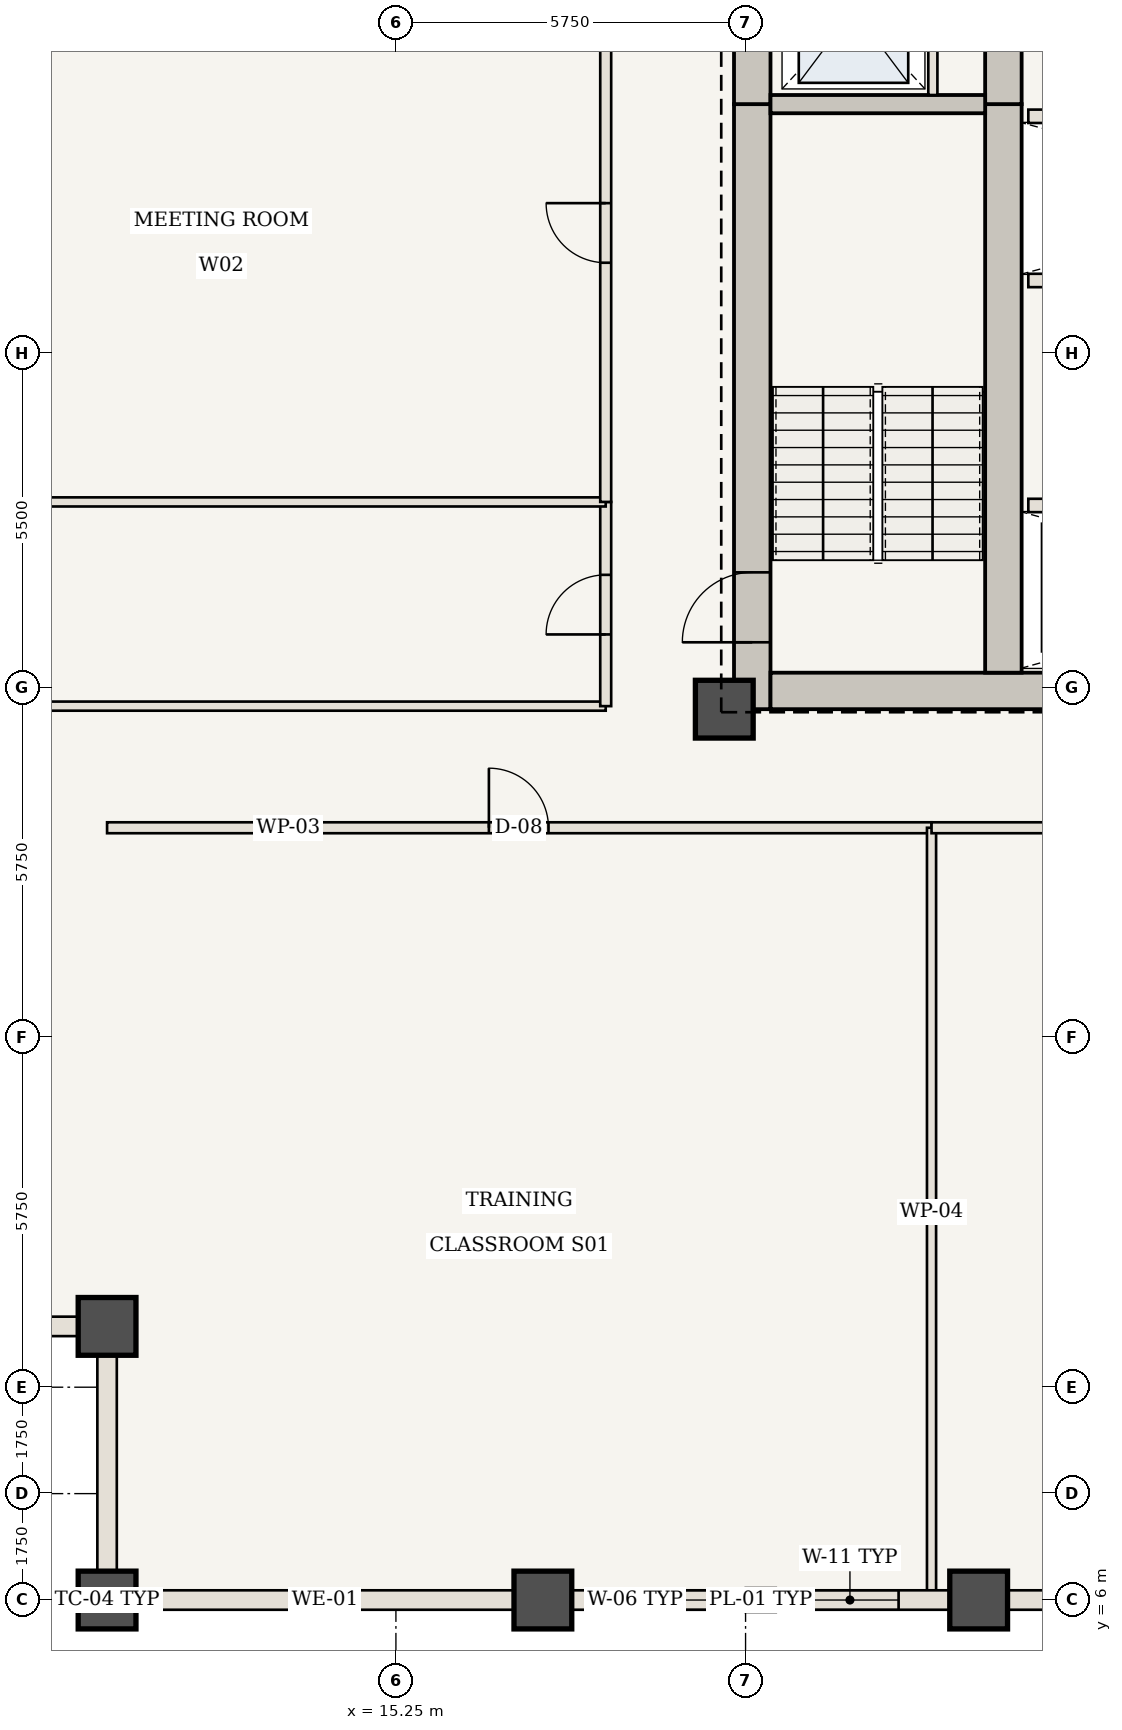
"""IFC4 building model, lengths in metres.
Left out: names, types, materials, properties, quantities, classifications, styles, units other than length and angle.
Written with IfcOpenShell. Run it as: python <this file> out.ifc"""

import sys

from ifc_helpers import new_model, si_unit, direction, frame, frame_2d, origin, origin_2d, place, context, subcontext, project, spatial, rectangle, extrude, element, fill, save


model = new_model("IFC4")
c1 = context("Model", 3, precision=1e-05, world=origin(), true_north=direction((0.0, 1.0)))
c2 = subcontext(c1, "Body", "Model", "MODEL_VIEW")
j1 = project(units=[si_unit("LENGTHUNIT", "METRE"), si_unit("PLANEANGLEUNIT", "RADIAN")], contexts=[c1])
p1 = place(None, origin())
s1 = spatial("IfcSite", under=j1, at=p1, CompositionType="ELEMENT")
p2 = place(p1, origin())
s2 = spatial("IfcBuilding", under=s1, at=p2, CompositionType="ELEMENT")
p3 = place(p2, frame((0.0, 0.0, 133.7)))
s3 = spatial("IfcBuildingStorey", under=s2, at=p3, CompositionType="ELEMENT", Elevation=133.7)
p4 = place(p3, frame((21.11, 20.65, 0.0), z_axis=(0.0, 0.0, 1.0), x_axis=(0.0, 1.0, 0.0)))
e1 = element("IfcWall", 1, at=p4, inside=s3, PredefinedType="SHEAR", context=c2, shape_type="SweptSolid", body=[
    extrude(rectangle(XDim=9.95, YDim=0.6, at=frame_2d((4.975, 0.0))), origin(), (0.0, 0.0, 1.0), 3.85),
])
p5 = place(p4, frame((1.1, 0.0, 0.0)))
e2 = element("IfcOpeningElement", 2, at=p5, cuts=e1, PredefinedType="OPENING", context=c2, shape_type="SweptSolid", body=[
    extrude(rectangle(XDim=1.15, YDim=2.15, at=frame_2d((0.575, 1.075))), frame((0.0, 0.31, 0.0), z_axis=(0.0, -1.0, 0.0), x_axis=(1.0, 0.0, 0.0)), (0.0, 0.0, 1.0), 0.62),
])
p6 = place(p3, frame((21.11, 30.6, 0.0), z_axis=(0.0, 0.0, 1.0), x_axis=(0.0, 1.0, 0.0)))
e3 = element("IfcWall", 3, at=p6, inside=s3, PredefinedType="SHEAR", context=c2, shape_type="SweptSolid", body=[
    extrude(rectangle(XDim=12.7, YDim=0.6, at=frame_2d((6.35, 0.0))), origin(), (0.0, 0.0, 1.0), 3.85),
])
p7 = place(p6, frame((4.2, 0.0, 0.0)))
e4 = element("IfcOpeningElement", 4, at=p7, cuts=e3, PredefinedType="OPENING", context=c2, shape_type="SweptSolid", body=[
    extrude(rectangle(XDim=1.1, YDim=2.15, at=frame_2d((0.55, 1.075))), frame((0.0, 0.31, 0.0), z_axis=(0.0, -1.0, 0.0), x_axis=(1.0, 0.0, 0.0)), (0.0, 0.0, 1.0), 0.62),
])
p8 = place(p6, frame((9.2, 0.0, 0.0)))
e5 = element("IfcOpeningElement", 5, at=p8, cuts=e3, PredefinedType="OPENING", context=c2, shape_type="SweptSolid", body=[
    extrude(rectangle(XDim=0.92, YDim=2.1, at=frame_2d((0.46, 1.05))), frame((0.0, 0.31, 0.0), z_axis=(0.0, -1.0, 0.0), x_axis=(1.0, 0.0, 0.0)), (0.0, 0.0, 1.0), 0.62),
])
p9 = place(p3, frame((21.41, 20.95, 0.0), z_axis=(0.0, 0.0, 1.0), x_axis=(1.0, 0.0, 0.0)))
e6 = element("IfcWall", 6, at=p9, inside=s3, PredefinedType="SHEAR", context=c2, shape_type="SweptSolid", body=[
    extrude(rectangle(XDim=13.74, YDim=0.6, at=frame_2d((6.87, 0.0))), origin(), (0.0, 0.0, 1.0), 3.85),
])
p10 = place(p3, frame((25.24, 21.25, 0.0), z_axis=(0.0, 0.0, 1.0), x_axis=(0.0, 1.0, 0.0)))
e7 = element("IfcWall", 7, at=p10, inside=s3, PredefinedType="SHEAR", context=c2, shape_type="SweptSolid", body=[
    extrude(rectangle(XDim=9.35, YDim=0.6, at=frame_2d((4.675, 0.0))), origin(), (0.0, 0.0, 1.0), 3.85),
])
p11 = place(p3, frame((25.24, 30.6, 0.0), z_axis=(0.0, 0.0, 1.0), x_axis=(0.0, 1.0, 0.0)))
e8 = element("IfcWall", 8, at=p11, inside=s3, PredefinedType="SHEAR", context=c2, shape_type="SweptSolid", body=[
    extrude(rectangle(XDim=12.1, YDim=0.6, at=frame_2d((6.05, 0.0))), origin(), (0.0, 0.0, 1.0), 3.85),
])
p12 = place(p11, frame((6.25, 0.0, 0.0)))
e9 = element("IfcOpeningElement", 9, at=p12, cuts=e8, PredefinedType="OPENING", context=c2, shape_type="SweptSolid", body=[
    extrude(rectangle(XDim=1.1, YDim=2.15, at=frame_2d((0.55, 1.075))), frame((0.0, 0.31, 0.0), z_axis=(0.0, -1.0, 0.0), x_axis=(1.0, 0.0, 0.0)), (0.0, 0.0, 1.0), 0.62),
])
for number, where, z_axis, x_axis in (
    (10, (20.65, 20.65, 0.0), (0.0, 0.0, 1.0), (1.0, 0.0, 0.0)),
    (11, (10.5, 6.0, 0.0), (0.0, 0.0, 1.0), (1.0, 0.0, 0.0)),
    (12, (10.5, 10.5, 0.0), (0.0, 0.0, 1.0), (1.0, 0.0, 0.0)),
    (13, (17.667, 6.0, 0.0), (0.0, 0.0, 1.0), (1.0, 0.0, 0.0)),
    (14, (24.833, 6.0, 0.0), (0.0, 0.0, 1.0), (1.0, 0.0, 0.0)),
):
    element("IfcColumn", number, at=place(p3, frame(where, z_axis=z_axis, x_axis=x_axis)), inside=s3, PredefinedType="COLUMN", context=c2, shape_type="SweptSolid", body=[
        extrude(rectangle(XDim=0.95, YDim=0.95, at=origin_2d()), origin(), (0.0, 0.0, 1.0), 3.85),
    ])
p13 = place(p3, frame((21.41, 30.6, 0.0), z_axis=(0.0, 0.0, 1.0), x_axis=(1.0, 0.0, 0.0)))
e15 = element("IfcWall", 15, at=p13, inside=s3, PredefinedType="SHEAR", context=c2, shape_type="SweptSolid", body=[
    extrude(rectangle(XDim=3.53, YDim=0.3, at=frame_2d((1.765, 0.0))), origin(), (0.0, 0.0, 1.0), 3.685),
])
p14 = place(p3, frame((24.08, 30.75, 0.0), z_axis=(0.0, 0.0, 1.0), x_axis=(0.0, 1.0, 0.0)))
e16 = element("IfcWall", 16, at=p14, inside=s3, PredefinedType="STANDARD", context=c2, shape_type="SweptSolid", body=[
    extrude(rectangle(XDim=2.65, YDim=0.15, at=frame_2d((1.325, 0.0))), origin(), (0.0, 0.0, 1.0), 3.685),
])
p15 = place(p3, frame((25.65, 24.0, 0.0), z_axis=(0.0, 0.0, 1.0), x_axis=(1.0, 0.0, 0.0)))
e17 = element("IfcWall", 17, at=p15, inside=s3, PredefinedType="STANDARD", context=c2, shape_type="SweptSolid", body=[
    extrude(rectangle(XDim=9.25, YDim=0.22, at=frame_2d((4.625, 0.0))), origin(), (0.0, 0.0, 1.0), 3.685),
])
p16 = place(p15, frame((0.58, 0.0, 0.0)))
e18 = element("IfcOpeningElement", 18, at=p16, cuts=e17, PredefinedType="OPENING", context=c2, shape_type="SweptSolid", body=[
    extrude(rectangle(XDim=1.1, YDim=2.15, at=frame_2d((0.55, 1.075))), frame((0.0, 0.12, 0.0), z_axis=(0.0, -1.0, 0.0), x_axis=(1.0, 0.0, 0.0)), (0.0, 0.0, 1.0), 0.24),
])
p17 = place(p15, frame((2.75, 0.0, 0.0)))
e19 = element("IfcOpeningElement", 19, at=p17, cuts=e17, PredefinedType="OPENING", context=c2, shape_type="SweptSolid", body=[
    extrude(rectangle(XDim=1.1, YDim=2.15, at=frame_2d((0.55, 1.075))), frame((0.0, 0.12, 0.0), z_axis=(0.0, -1.0, 0.0), x_axis=(1.0, 0.0, 0.0)), (0.0, 0.0, 1.0), 0.24),
])
p18 = place(p15, frame((5.05, 0.0, 0.0)))
e20 = element("IfcOpeningElement", 20, at=p18, cuts=e17, PredefinedType="OPENING", context=c2, shape_type="SweptSolid", body=[
    extrude(rectangle(XDim=1.1, YDim=2.15, at=frame_2d((0.55, 1.075))), frame((0.0, 0.12, 0.0), z_axis=(0.0, -1.0, 0.0), x_axis=(1.0, 0.0, 0.0)), (0.0, 0.0, 1.0), 0.24),
])
p19 = place(p15, frame((7.35, 0.0, 0.0)))
e21 = element("IfcOpeningElement", 21, at=p19, cuts=e17, PredefinedType="OPENING", context=c2, shape_type="SweptSolid", body=[
    extrude(rectangle(XDim=1.1, YDim=2.15, at=frame_2d((0.55, 1.075))), frame((0.0, 0.12, 0.0), z_axis=(0.0, -1.0, 0.0), x_axis=(1.0, 0.0, 0.0)), (0.0, 0.0, 1.0), 0.24),
])
for number, where, z_axis, x_axis in (
    (22, (25.65, 27.7, 0.0), (0.0, 0.0, 1.0), (1.0, 0.0, 0.0)),
    (23, (25.65, 30.4, 0.0), (0.0, 0.0, 1.0), (1.0, 0.0, 0.0)),
):
    element("IfcWall", number, at=place(p3, frame(where, z_axis=z_axis, x_axis=x_axis)), inside=s3, PredefinedType="STANDARD", context=c2, shape_type="SweptSolid", body=[
        extrude(rectangle(XDim=9.25, YDim=0.22, at=frame_2d((4.625, 0.0))), origin(), (0.0, 0.0, 1.0), 3.685),
    ])
p20 = place(p3, frame((10.5, 18.7, 0.0), z_axis=(0.0, 0.0, 1.0), x_axis=(1.0, 0.0, 0.0)))
e24 = element("IfcWall", 24, at=p20, inside=s3, PredefinedType="STANDARD", context=c2, shape_type="SweptSolid", body=[
    extrude(rectangle(XDim=13.558, YDim=0.18, at=frame_2d((6.779, 0.0))), origin(), (0.0, 0.0, 1.0), 3.685),
])
p21 = place(p20, frame((6.279, 0.0, 0.0)))
e25 = element("IfcOpeningElement", 25, at=p21, cuts=e24, PredefinedType="OPENING", context=c2, shape_type="SweptSolid", body=[
    extrude(rectangle(XDim=0.98, YDim=2.2, at=frame_2d((0.49, 1.1))), frame((0.0, 0.1, 0.0), z_axis=(0.0, -1.0, 0.0), x_axis=(1.0, 0.0, 0.0)), (0.0, 0.0, 1.0), 0.2),
])
p22 = place(p3, frame((24.058, 6.06, 0.0), z_axis=(0.0, 0.0, 1.0), x_axis=(0.0, 1.0, 0.0)))
e26 = element("IfcWall", 26, at=p22, inside=s3, PredefinedType="STANDARD", context=c2, shape_type="SweptSolid", body=[
    extrude(rectangle(XDim=12.64, YDim=0.15, at=frame_2d((6.32, 0.0))), origin(), (0.0, 0.0, 1.0), 3.685),
])
p23 = place(p3, frame((24.058, 18.7, 0.0), z_axis=(0.0, 0.0, 1.0), x_axis=(1.0, 0.0, 0.0)))
e27 = element("IfcWall", 27, at=p23, inside=s3, PredefinedType="STANDARD", context=c2, shape_type="SweptSolid", body=[
    extrude(rectangle(XDim=16.033, YDim=0.18, at=frame_2d((8.017, 0.0))), origin(), (0.0, 0.0, 1.0), 3.685),
])
p24 = place(p23, frame((8.967, 0.0, 0.0)))
e28 = element("IfcOpeningElement", 28, at=p24, cuts=e27, PredefinedType="OPENING", context=c2, shape_type="SweptSolid", body=[
    extrude(rectangle(XDim=0.98, YDim=2.2, at=frame_2d((0.49, 1.1))), frame((0.0, 0.1, 0.0), z_axis=(0.0, -1.0, 0.0), x_axis=(1.0, 0.0, 0.0)), (0.0, 0.0, 1.0), 0.2),
])
p25 = place(p3, frame((6.06, 20.7, 0.0), z_axis=(0.0, 0.0, 1.0), x_axis=(1.0, 0.0, 0.0)))
e29 = element("IfcWall", 29, at=p25, inside=s3, PredefinedType="STANDARD", context=c2, shape_type="SweptSolid", body=[
    extrude(rectangle(XDim=12.64, YDim=0.15, at=frame_2d((6.32, 0.0))), origin(), (0.0, 0.0, 1.0), 3.065),
])
p26 = place(p3, frame((18.7, 20.7, 0.0), z_axis=(0.0, 0.0, 1.0), x_axis=(0.0, 1.0, 0.0)))
e30 = element("IfcWall", 30, at=p26, inside=s3, PredefinedType="STANDARD", context=c2, shape_type="SweptSolid", body=[
    extrude(rectangle(XDim=3.358, YDim=0.18, at=frame_2d((1.679, 0.0))), origin(), (0.0, 0.0, 1.0), 3.685),
])
p27 = place(p26, frame((1.179, 0.0, 0.0)))
e31 = element("IfcOpeningElement", 31, at=p27, cuts=e30, PredefinedType="OPENING", context=c2, shape_type="SweptSolid", body=[
    extrude(rectangle(XDim=0.98, YDim=2.2, at=frame_2d((0.49, 1.1))), frame((0.0, 0.1, 0.0), z_axis=(0.0, -1.0, 0.0), x_axis=(1.0, 0.0, 0.0)), (0.0, 0.0, 1.0), 0.2),
])
p28 = place(p3, frame((6.06, 24.058, 0.0), z_axis=(0.0, 0.0, 1.0), x_axis=(1.0, 0.0, 0.0)))
e32 = element("IfcWall", 32, at=p28, inside=s3, PredefinedType="STANDARD", context=c2, shape_type="SweptSolid", body=[
    extrude(rectangle(XDim=12.64, YDim=0.15, at=frame_2d((6.32, 0.0))), origin(), (0.0, 0.0, 1.0), 3.685),
])
p29 = place(p3, frame((18.7, 24.058, 0.0), z_axis=(0.0, 0.0, 1.0), x_axis=(0.0, 1.0, 0.0)))
e33 = element("IfcWall", 33, at=p29, inside=s3, PredefinedType="STANDARD", context=c2, shape_type="SweptSolid", body=[
    extrude(rectangle(XDim=8.867, YDim=0.18, at=frame_2d((4.433, 0.0))), origin(), (0.0, 0.0, 1.0), 3.685),
])
p30 = place(p29, frame((3.933, 0.0, 0.0)))
e34 = element("IfcOpeningElement", 34, at=p30, cuts=e33, PredefinedType="OPENING", context=c2, shape_type="SweptSolid", body=[
    extrude(rectangle(XDim=0.98, YDim=2.2, at=frame_2d((0.49, 1.1))), frame((0.0, 0.1, 0.0), z_axis=(0.0, -1.0, 0.0), x_axis=(1.0, 0.0, 0.0)), (0.0, 0.0, 1.0), 0.2),
])
p31 = place(p3, frame((17.667, 6.0, 0.0), z_axis=(0.0, 0.0, 1.0), x_axis=(-1.0, 0.0, 0.0)))
e35 = element("IfcWall", 35, at=p31, inside=s3, PredefinedType="USERDEFINED", context=c2, shape_type="SweptSolid", body=[
    extrude(rectangle(XDim=7.167, YDim=0.32, at=frame_2d((3.583, 0.0))), origin(), (0.0, 0.0, 1.0), 2.885),
])
p32 = place(p3, frame((24.833, 6.0, 0.0), z_axis=(0.0, 0.0, 1.0), x_axis=(-1.0, 0.0, 0.0)))
e36 = element("IfcWall", 36, at=p32, inside=s3, PredefinedType="USERDEFINED", context=c2, shape_type="SweptSolid", body=[
    extrude(rectangle(XDim=7.167, YDim=0.32, at=frame_2d((3.583, 0.0))), origin(), (0.0, 0.0, 1.0), 2.885),
])
p33 = place(p32, frame((1.317, 0.0, 0.85)))
e37 = element("IfcOpeningElement", 37, at=p33, cuts=e36, PredefinedType="OPENING", context=c2, shape_type="SweptSolid", body=[
    extrude(rectangle(XDim=1.6, YDim=1.835, at=frame_2d((0.8, 0.917))), frame((0.0, 0.17, 0.0), z_axis=(0.0, -1.0, 0.0), x_axis=(1.0, 0.0, 0.0)), (0.0, 0.0, 1.0), 0.34),
])
p34 = place(p32, frame((4.175, 0.0, 0.85)))
e38 = element("IfcOpeningElement", 38, at=p34, cuts=e36, PredefinedType="OPENING", context=c2, shape_type="SweptSolid", body=[
    extrude(rectangle(XDim=2.2, YDim=1.835, at=frame_2d((1.1, 0.917))), frame((0.0, 0.17, 0.0), z_axis=(0.0, -1.0, 0.0), x_axis=(1.0, 0.0, 0.0)), (0.0, 0.0, 1.0), 0.34),
])
p35 = place(p3, frame((32.0, 6.0, 0.0), z_axis=(0.0, 0.0, 1.0), x_axis=(-1.0, 0.0, 0.0)))
e39 = element("IfcWall", 39, at=p35, inside=s3, PredefinedType="USERDEFINED", context=c2, shape_type="SweptSolid", body=[
    extrude(rectangle(XDim=7.167, YDim=0.32, at=frame_2d((3.583, 0.0))), origin(), (0.0, 0.0, 1.0), 2.885),
])
p36 = place(p35, frame((2.083, 0.0, 0.85)))
e40 = element("IfcOpeningElement", 40, at=p36, cuts=e39, PredefinedType="OPENING", context=c2, shape_type="SweptSolid", body=[
    extrude(rectangle(XDim=3.0, YDim=1.835, at=frame_2d((1.5, 0.917))), frame((0.0, 0.17, 0.0), z_axis=(0.0, -1.0, 0.0), x_axis=(1.0, 0.0, 0.0)), (0.0, 0.0, 1.0), 0.34),
])
for number, where, z_axis, x_axis in (
    (41, (10.5, 6.0, 0.0), (0.0, 0.0, 1.0), (0.0, 1.0, 0.0)),
    (42, (10.5, 10.5, 0.0), (0.0, 0.0, 1.0), (-1.0, 0.0, 0.0)),
):
    element("IfcWall", number, at=place(p3, frame(where, z_axis=z_axis, x_axis=x_axis)), inside=s3, PredefinedType="USERDEFINED", context=c2, shape_type="SweptSolid", body=[
        extrude(rectangle(XDim=4.5, YDim=0.32, at=frame_2d((2.25, 0.0))), origin(), (0.0, 0.0, 1.0), 2.885),
    ])
p37 = place(p5, origin())
e43 = element("IfcDoor", 43, at=p37, inside=s3, OperationType="SINGLE_SWING_LEFT", PredefinedType="DOOR", context=c2, shape_type="SweptSolid", body=[
    extrude(rectangle(XDim=1.15, YDim=2.15, at=frame_2d((0.575, 1.075))), frame((0.0, 0.025, 0.0), z_axis=(0.0, -1.0, 0.0), x_axis=(1.0, 0.0, 0.0)), (0.0, 0.0, 1.0), 0.05),
])
fill(e2, e43)
p38 = place(p21, origin())
e44 = element("IfcDoor", 44, at=p38, inside=s3, OperationType="SINGLE_SWING_LEFT", PredefinedType="DOOR", context=c2, shape_type="SweptSolid", body=[
    extrude(rectangle(XDim=0.98, YDim=2.2, at=frame_2d((0.49, 1.1))), frame((0.0, 0.025, 0.0), z_axis=(0.0, -1.0, 0.0), x_axis=(1.0, 0.0, 0.0)), (0.0, 0.0, 1.0), 0.05),
])
fill(e25, e44)
p39 = place(p27, origin())
e45 = element("IfcDoor", 45, at=p39, inside=s3, OperationType="SINGLE_SWING_LEFT", PredefinedType="DOOR", context=c2, shape_type="SweptSolid", body=[
    extrude(rectangle(XDim=0.98, YDim=2.2, at=frame_2d((0.49, 1.1))), frame((0.0, 0.025, 0.0), z_axis=(0.0, -1.0, 0.0), x_axis=(1.0, 0.0, 0.0)), (0.0, 0.0, 1.0), 0.05),
])
fill(e31, e45)
p40 = place(p30, origin())
e46 = element("IfcDoor", 46, at=p40, inside=s3, OperationType="SINGLE_SWING_RIGHT", PredefinedType="DOOR", context=c2, shape_type="SweptSolid", body=[
    extrude(rectangle(XDim=0.98, YDim=2.2, at=frame_2d((0.49, 1.1))), frame((0.0, 0.025, 0.0), z_axis=(0.0, -1.0, 0.0), x_axis=(1.0, 0.0, 0.0)), (0.0, 0.0, 1.0), 0.05),
])
fill(e34, e46)
p41 = place(p33, origin())
e47 = element("IfcWindow", 47, at=p41, inside=s3, PartitioningType="SINGLE_PANEL", PredefinedType="WINDOW", context=c2, shape_type="SweptSolid", body=[
    extrude(rectangle(XDim=1.6, YDim=1.835, at=frame_2d((0.8, 0.917))), frame((0.0, 0.03, 0.0), z_axis=(0.0, -1.0, 0.0), x_axis=(1.0, 0.0, 0.0)), (0.0, 0.0, 1.0), 0.06),
])
fill(e37, e47)
p42 = place(p34, origin())
e48 = element("IfcWindow", 48, at=p42, inside=s3, PartitioningType="SINGLE_PANEL", PredefinedType="WINDOW", context=c2, shape_type="SweptSolid", body=[
    extrude(rectangle(XDim=2.2, YDim=1.835, at=frame_2d((1.1, 0.917))), frame((0.0, 0.03, 0.0), z_axis=(0.0, -1.0, 0.0), x_axis=(1.0, 0.0, 0.0)), (0.0, 0.0, 1.0), 0.06),
])
fill(e38, e48)
save(model, sys.argv[1])
